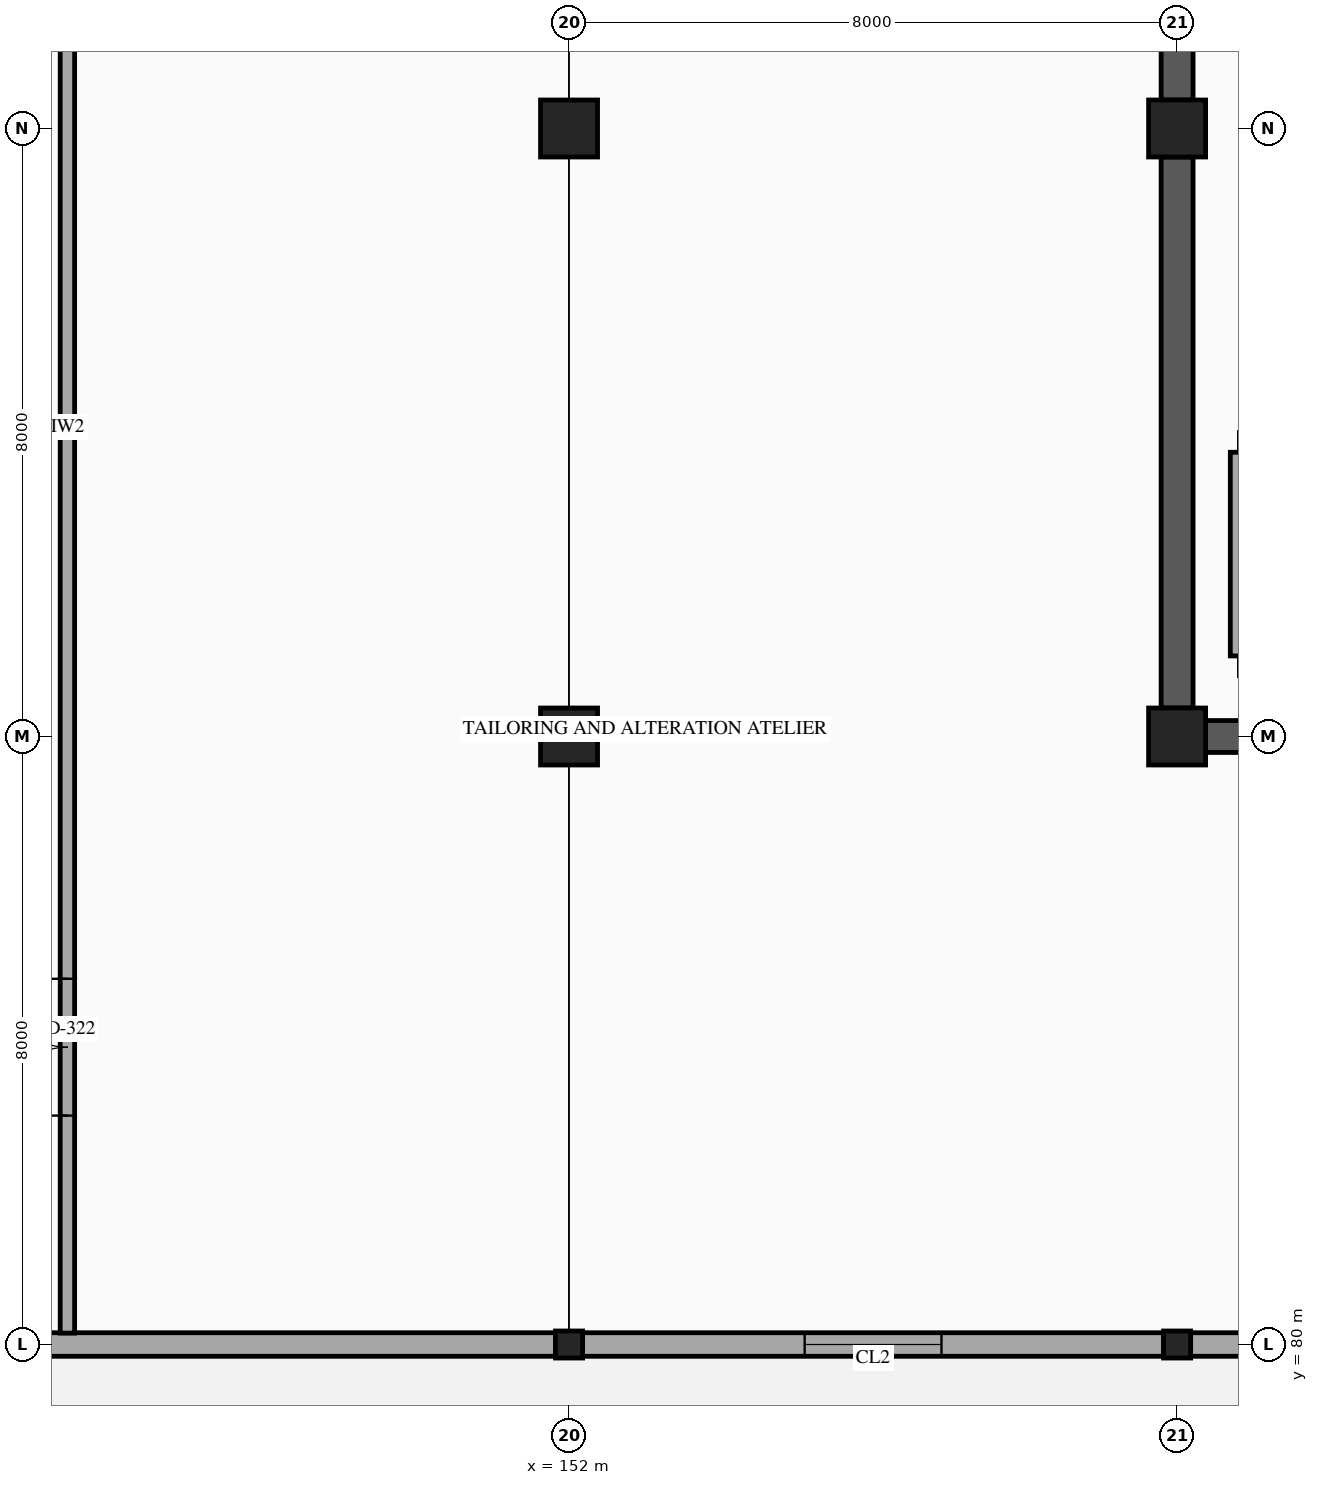
"""IFC4 building model, lengths in metres.
Left out: names, types, materials, properties, quantities, classifications, styles, units other than length and angle.
Written with IfcOpenShell. Run it as: python <this file> out.ifc"""

import sys

from ifc_helpers import new_model, si_unit, direction, frame, frame_2d, origin, origin_2d, place, context, subcontext, project, spatial, rectangle, hollow_rectangle, extrude, element, fill, save


model = new_model("IFC4")
c1 = context("Model", 3, precision=1e-05, world=origin(), true_north=direction((0.0, 1.0)))
c2 = subcontext(c1, "Body", "Model", "MODEL_VIEW")
j1 = project(units=[si_unit("LENGTHUNIT", "METRE"), si_unit("PLANEANGLEUNIT", "RADIAN")], contexts=[c1])
p1 = place(None, origin())
s1 = spatial("IfcSite", under=j1, at=p1, CompositionType="ELEMENT")
p2 = place(p1, origin())
s2 = spatial("IfcBuilding", under=s1, at=p2, CompositionType="ELEMENT")
p3 = place(p2, frame((0.0, 0.0, 10.4)))
s3 = spatial("IfcBuildingStorey", under=s2, at=p3, CompositionType="ELEMENT", Elevation=10.4)
p4 = place(p3, frame((152.0, 80.0, 0.0), z_axis=(0.0, 0.0, 1.0), x_axis=(1.0, 0.0, 0.0)))
e1 = element("IfcColumn", 1, at=p4, inside=s3, PredefinedType="COLUMN", context=c2, shape_type="SweptSolid", body=[
    extrude(hollow_rectangle(XDim=0.356, YDim=0.356, WallThickness=0.012, InnerFilletRadius=0.012, OuterFilletRadius=0.024, at=origin_2d()), origin(), (0.0, 0.0, 1.0), 4.5),
])
for number, where, z_axis, x_axis in (
    (2, (152.0, 88.0, 0.0), (0.0, 0.0, 1.0), (1.0, 0.0, 0.0)),
    (3, (152.0, 96.0, 0.0), (0.0, 0.0, 1.0), (1.0, 0.0, 0.0)),
):
    element("IfcColumn", number, at=place(p3, frame(where, z_axis=z_axis, x_axis=x_axis)), inside=s3, PredefinedType="COLUMN", context=c2, shape_type="SweptSolid", body=[
        extrude(rectangle(XDim=0.75, YDim=0.75, at=origin_2d()), origin(), (0.0, 0.0, 1.0), 4.5),
    ])
p5 = place(p3, frame((160.0, 80.0, 0.0), z_axis=(0.0, 0.0, 1.0), x_axis=(1.0, 0.0, 0.0)))
e4 = element("IfcColumn", 4, at=p5, inside=s3, PredefinedType="COLUMN", context=c2, shape_type="SweptSolid", body=[
    extrude(hollow_rectangle(XDim=0.356, YDim=0.356, WallThickness=0.012, InnerFilletRadius=0.012, OuterFilletRadius=0.024, at=origin_2d()), origin(), (0.0, 0.0, 1.0), 4.5),
])
for number, where, z_axis, x_axis in (
    (5, (160.0, 88.0, 0.0), (0.0, 0.0, 1.0), (1.0, 0.0, 0.0)),
    (6, (160.0, 96.0, 0.0), (0.0, 0.0, 1.0), (1.0, 0.0, 0.0)),
):
    element("IfcColumn", number, at=place(p3, frame(where, z_axis=z_axis, x_axis=x_axis)), inside=s3, PredefinedType="COLUMN", context=c2, shape_type="SweptSolid", body=[
        extrude(rectangle(XDim=0.75, YDim=0.75, at=origin_2d()), origin(), (0.0, 0.0, 1.0), 4.5),
    ])
p6 = place(p3, frame((167.822, 80.0, 0.0), z_axis=(0.0, 0.0, 1.0), x_axis=(-1.0, 0.0, 0.0)))
e7 = element("IfcWall", 7, at=p6, inside=s3, PredefinedType="STANDARD", context=c2, shape_type="SweptSolid", body=[
    extrude(rectangle(XDim=7.644, YDim=0.31, at=frame_2d((3.822, 0.0))), origin(), (0.0, 0.0, 1.0), 3.48),
])
p7 = place(p6, frame((2.922, 0.0, 0.8)))
e8 = element("IfcOpeningElement", 8, at=p7, cuts=e7, PredefinedType="OPENING", context=c2, shape_type="SweptSolid", body=[
    extrude(rectangle(XDim=1.8, YDim=2.4, at=frame_2d((0.9, 1.2))), frame((0.0, 0.165, 0.0), z_axis=(0.0, -1.0, 0.0), x_axis=(1.0, 0.0, 0.0)), (0.0, 0.0, 1.0), 0.33),
])
p8 = place(p3, frame((159.822, 80.0, 0.0), z_axis=(0.0, 0.0, 1.0), x_axis=(-1.0, 0.0, 0.0)))
e9 = element("IfcWall", 9, at=p8, inside=s3, PredefinedType="STANDARD", context=c2, shape_type="SweptSolid", body=[
    extrude(rectangle(XDim=7.644, YDim=0.31, at=frame_2d((3.822, 0.0))), origin(), (0.0, 0.0, 1.0), 3.48),
])
p9 = place(p8, frame((2.922, 0.0, 0.8)))
e10 = element("IfcOpeningElement", 10, at=p9, cuts=e9, PredefinedType="OPENING", context=c2, shape_type="SweptSolid", body=[
    extrude(rectangle(XDim=1.8, YDim=2.4, at=frame_2d((0.9, 1.2))), frame((0.0, 0.165, 0.0), z_axis=(0.0, -1.0, 0.0), x_axis=(1.0, 0.0, 0.0)), (0.0, 0.0, 1.0), 0.33),
])
p10 = place(p3, frame((151.822, 80.0, 0.0), z_axis=(0.0, 0.0, 1.0), x_axis=(-1.0, 0.0, 0.0)))
e11 = element("IfcWall", 11, at=p10, inside=s3, PredefinedType="STANDARD", context=c2, shape_type="SweptSolid", body=[
    extrude(rectangle(XDim=7.644, YDim=0.31, at=frame_2d((3.822, 0.0))), origin(), (0.0, 0.0, 1.0), 3.48),
])
for number, where, z_axis, x_axis in (
    (12, (160.375, 88.0, 0.0), (0.0, 0.0, 1.0), (1.0, 0.0, 0.0)),
    (13, (160.0, 88.375, 0.0), (0.0, 0.0, 1.0), (0.0, 1.0, 0.0)),
    (14, (160.0, 96.375, 0.0), (0.0, 0.0, 1.0), (0.0, 1.0, 0.0)),
):
    element("IfcWall", number, at=place(p3, frame(where, z_axis=z_axis, x_axis=x_axis)), inside=s3, PredefinedType="SHEAR", context=c2, shape_type="SweptSolid", body=[
        extrude(rectangle(XDim=7.25, YDim=0.42, at=frame_2d((3.625, 0.0))), origin(), (0.0, 0.0, 1.0), 4.28),
    ])
p11 = place(p3, frame((160.82, 89.06, 0.0), z_axis=(0.0, 0.0, 1.0), x_axis=(0.0, 1.0, 0.0)))
e15 = element("IfcWall", 15, at=p11, inside=s3, PredefinedType="PARTITIONING", context=c2, shape_type="SweptSolid", body=[
    extrude(rectangle(XDim=2.68, YDim=0.24, at=frame_2d((1.34, 0.0))), origin(), (0.0, 0.0, 1.0), 4.28),
])
p12 = place(p3, frame((145.4, 80.15, 0.0), z_axis=(0.0, 0.0, 1.0), x_axis=(0.0, 1.0, 0.0)))
e16 = element("IfcWall", 16, at=p12, inside=s3, PredefinedType="PARTITIONING", context=c2, shape_type="SweptSolid", body=[
    extrude(rectangle(XDim=23.85, YDim=0.19, at=frame_2d((11.925, 0.0))), origin(), (0.0, 0.0, 1.0), 3.48),
])
p13 = place(p12, frame((2.862, 0.0, 0.0)))
e17 = element("IfcOpeningElement", 17, at=p13, cuts=e16, PredefinedType="OPENING", context=c2, shape_type="SweptSolid", body=[
    extrude(rectangle(XDim=1.8, YDim=2.25, at=frame_2d((0.9, 1.125))), frame((0.0, 0.105, 0.0), z_axis=(0.0, -1.0, 0.0), x_axis=(1.0, 0.0, 0.0)), (0.0, 0.0, 1.0), 0.21),
])
p14 = place(p9, origin())
e18 = element("IfcWindow", 18, at=p14, inside=s3, PartitioningType="DOUBLE_PANEL_HORIZONTAL", PredefinedType="WINDOW", context=c2, shape_type="SweptSolid", body=[
    extrude(rectangle(XDim=1.8, YDim=2.4, at=frame_2d((0.9, 1.2))), frame((0.0, 0.03, 0.0), z_axis=(0.0, -1.0, 0.0), x_axis=(1.0, 0.0, 0.0)), (0.0, 0.0, 1.0), 0.06),
])
fill(e10, e18)
p15 = place(p13, origin())
e19 = element("IfcDoor", 19, at=p15, inside=s3, OperationType="DOUBLE_DOOR_SINGLE_SWING", PredefinedType="DOOR", context=c2, shape_type="SweptSolid", body=[
    extrude(rectangle(XDim=1.8, YDim=2.25, at=frame_2d((0.9, 1.125))), frame((0.0, 0.025, 0.0), z_axis=(0.0, -1.0, 0.0), x_axis=(1.0, 0.0, 0.0)), (0.0, 0.0, 1.0), 0.05),
])
fill(e17, e19)
save(model, sys.argv[1])
